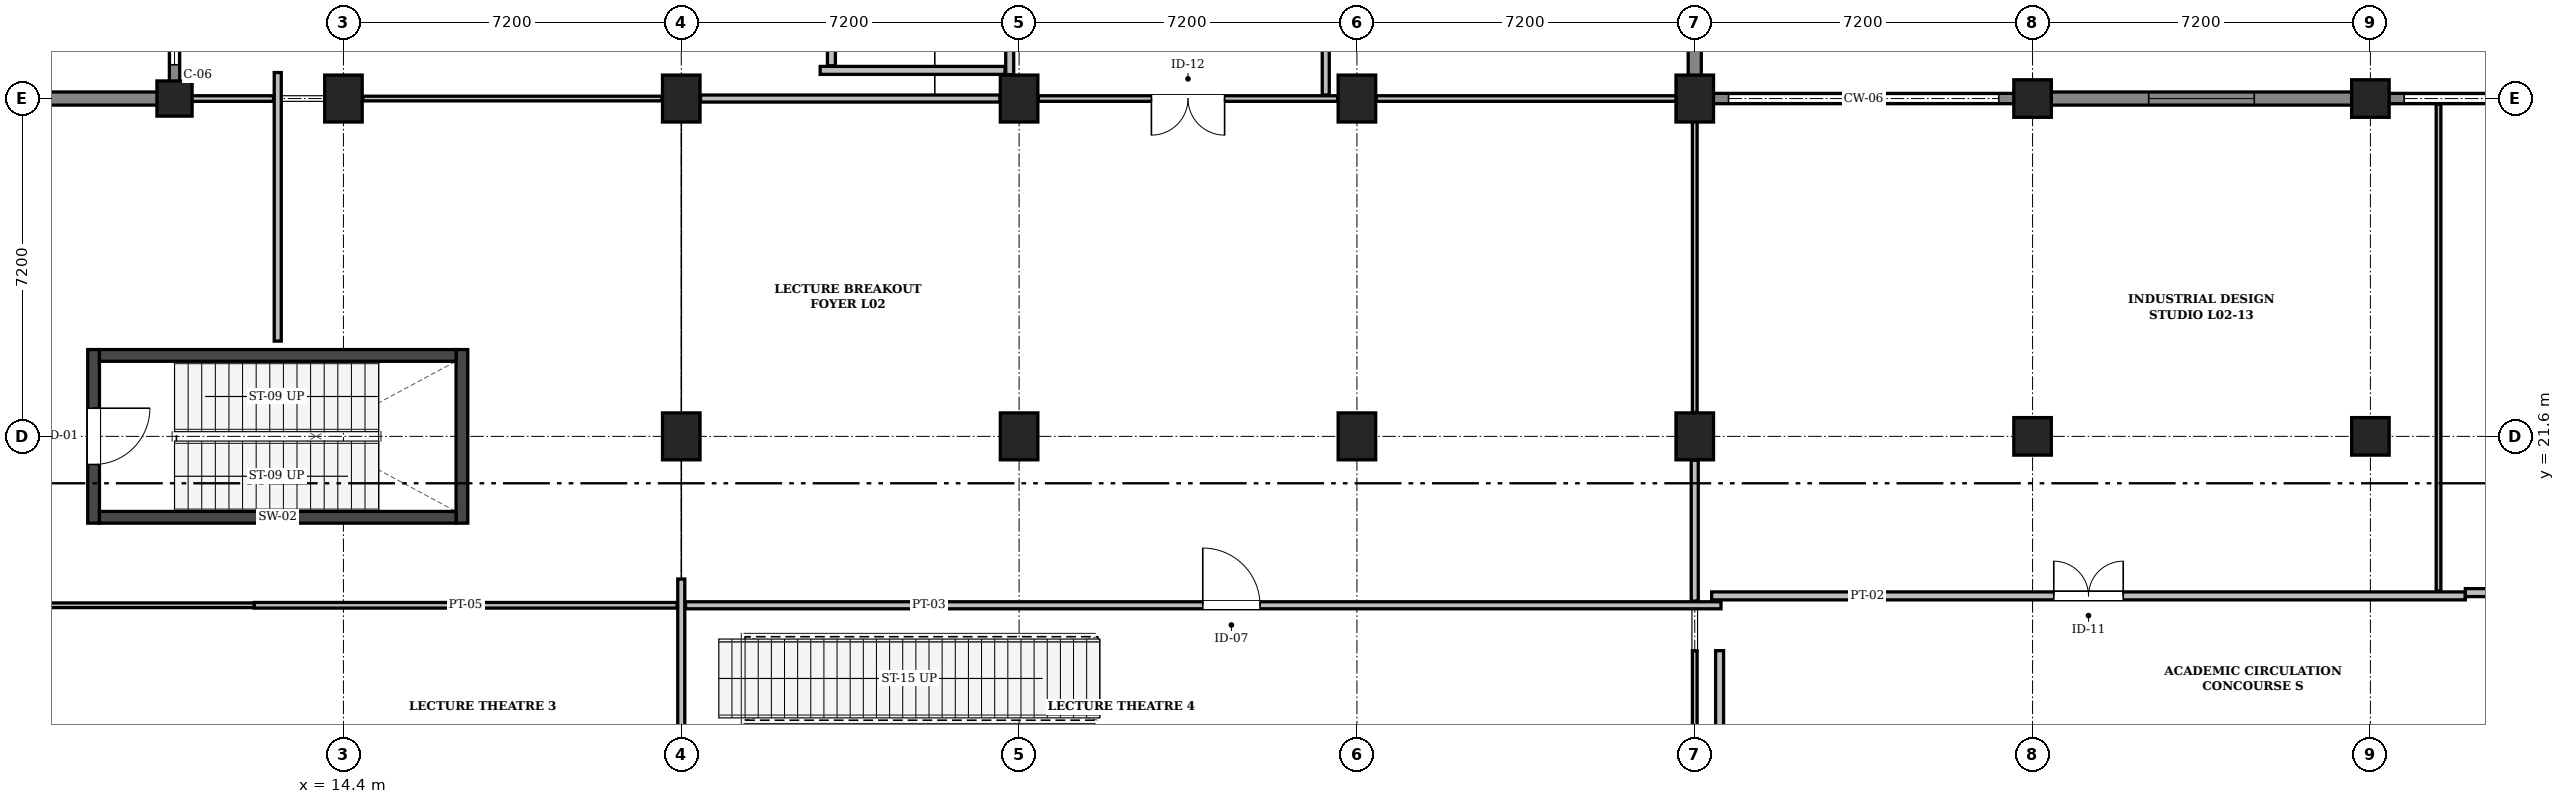
"""IFC4 building model, lengths in metres.
Left out: names, types, materials, properties, quantities, classifications, styles, units other than length and angle.
Written with IfcOpenShell. Run it as: python <this file> out.ifc"""

import sys

from ifc_helpers import new_model, si_unit, direction, frame, frame_2d, origin, origin_2d, place, context, subcontext, project, spatial, rectangle, extrude, element, fill, save


model = new_model("IFC4")
c1 = context("Model", 3, precision=1e-05, world=origin(), true_north=direction((0.0, 1.0)))
c2 = subcontext(c1, "Body", "Model", "MODEL_VIEW")
j1 = project(units=[si_unit("LENGTHUNIT", "METRE"), si_unit("PLANEANGLEUNIT", "RADIAN")], contexts=[c1])
p1 = place(None, origin())
s1 = spatial("IfcSite", under=j1, at=p1, CompositionType="ELEMENT")
p2 = place(p1, origin())
s2 = spatial("IfcBuilding", under=s1, at=p2, CompositionType="ELEMENT")
p3 = place(p2, frame((0.0, 0.0, 9.6)))
s3 = spatial("IfcBuildingStorey", under=s2, at=p3, CompositionType="ELEMENT", Elevation=9.6)
p4 = place(p3, frame((10.8, 28.8, 0.0), z_axis=(0.0, 0.0, 1.0), x_axis=(1.0, 0.0, 0.0)))
e1 = element("IfcColumn", 1, at=p4, inside=s3, PredefinedType="COLUMN", context=c2, shape_type="SweptSolid", body=[
    extrude(rectangle(XDim=0.75, YDim=0.75, at=origin_2d()), origin(), (0.0, 0.0, 1.0), 4.8),
])
for number, where, z_axis, x_axis in (
    (2, (14.4, 28.8, 0.0), (0.0, 0.0, 1.0), (1.0, 0.0, 0.0)),
    (3, (21.6, 21.6, 0.0), (0.0, 0.0, 1.0), (1.0, 0.0, 0.0)),
    (4, (21.6, 28.8, 0.0), (0.0, 0.0, 1.0), (1.0, 0.0, 0.0)),
    (5, (28.8, 21.6, 0.0), (0.0, 0.0, 1.0), (1.0, 0.0, 0.0)),
    (6, (28.8, 28.8, 0.0), (0.0, 0.0, 1.0), (1.0, 0.0, 0.0)),
    (7, (36.0, 21.6, 0.0), (0.0, 0.0, 1.0), (1.0, 0.0, 0.0)),
    (8, (36.0, 28.8, 0.0), (0.0, 0.0, 1.0), (1.0, 0.0, 0.0)),
    (9, (43.2, 21.6, 0.0), (0.0, 0.0, 1.0), (1.0, 0.0, 0.0)),
    (10, (43.2, 28.8, 0.0), (0.0, 0.0, 1.0), (1.0, 0.0, 0.0)),
):
    element("IfcColumn", number, at=place(p3, frame(where, z_axis=z_axis, x_axis=x_axis)), inside=s3, PredefinedType="COLUMN", context=c2, shape_type="SweptSolid", body=[
        extrude(rectangle(XDim=0.8, YDim=1.0, at=origin_2d()), origin(), (0.0, 0.0, 1.0), 4.8),
    ])
for number, where, z_axis, x_axis in (
    (11, (50.4, 21.6, 0.0), (0.0, 0.0, 1.0), (1.0, 0.0, 0.0)),
    (12, (50.4, 28.8, 0.0), (0.0, 0.0, 1.0), (1.0, 0.0, 0.0)),
    (13, (57.6, 21.6, 0.0), (0.0, 0.0, 1.0), (1.0, 0.0, 0.0)),
    (14, (57.6, 28.8, 0.0), (0.0, 0.0, 1.0), (1.0, 0.0, 0.0)),
):
    element("IfcColumn", number, at=place(p3, frame(where, z_axis=z_axis, x_axis=x_axis)), inside=s3, PredefinedType="COLUMN", context=c2, shape_type="SweptSolid", body=[
        extrude(rectangle(XDim=0.8, YDim=0.8, at=origin_2d()), origin(), (0.0, 0.0, 1.0), 4.8),
    ])
p5 = place(p3, frame((10.8, 28.966, 0.0), z_axis=(0.0, 0.0, 1.0), x_axis=(0.0, 1.0, 0.0)))
e15 = element("IfcWall", 15, at=p5, inside=s3, PredefinedType="SOLIDWALL", context=c2, shape_type="SweptSolid", body=[
    extrude(rectangle(XDim=7.034, YDim=0.22, at=frame_2d((3.517, 0.0))), origin(), (0.0, 0.0, 1.0), 1.24),
])
p6 = place(p3, frame((7.2, 28.8, 0.0), z_axis=(0.0, 0.0, 1.0), x_axis=(1.0, 0.0, 0.0)))
e16 = element("IfcWall", 16, at=p6, inside=s3, PredefinedType="SOLIDWALL", context=c2, shape_type="SweptSolid", body=[
    extrude(rectangle(XDim=3.75, YDim=0.28, at=frame_2d((1.875, 0.0))), origin(), (0.0, 0.0, 1.0), 4.52),
])
p7 = place(p3, frame((43.05, 28.8, 0.0), z_axis=(0.0, 0.0, 1.0), x_axis=(1.0, 0.0, 0.0)))
e17 = element("IfcWall", 17, at=p7, inside=s3, PredefinedType="SOLIDWALL", context=c2, shape_type="SweptSolid", body=[
    extrude(rectangle(XDim=7.35, YDim=0.22, at=frame_2d((3.675, 0.0))), origin(), (0.0, 0.0, 1.0), 1.24),
])
p8 = place(p3, frame((50.4, 28.8, 0.0), z_axis=(0.0, 0.0, 1.0), x_axis=(1.0, 0.0, 0.0)))
e18 = element("IfcWall", 18, at=p8, inside=s3, PredefinedType="SOLIDWALL", context=c2, shape_type="SweptSolid", body=[
    extrude(rectangle(XDim=7.2, YDim=0.28, at=frame_2d((3.6, 0.0))), origin(), (0.0, 0.0, 1.0), 4.52),
])
p9 = place(p8, frame((2.475, 0.0, 0.95)))
e19 = element("IfcOpeningElement", 19, at=p9, cuts=e18, PredefinedType="OPENING", context=c2, shape_type="SweptSolid", body=[
    extrude(rectangle(XDim=2.25, YDim=1.55, at=frame_2d((1.125, 0.775))), frame((0.0, 0.152, 0.0), z_axis=(0.0, -1.0, 0.0), x_axis=(1.0, 0.0, 0.0)), (0.0, 0.0, 1.0), 0.304),
])
p10 = place(p3, frame((57.6, 28.8, 0.0), z_axis=(0.0, 0.0, 1.0), x_axis=(1.0, 0.0, 0.0)))
e20 = element("IfcWall", 20, at=p10, inside=s3, PredefinedType="SOLIDWALL", context=c2, shape_type="SweptSolid", body=[
    extrude(rectangle(XDim=7.2, YDim=0.22, at=frame_2d((3.6, 0.0))), origin(), (0.0, 0.0, 1.0), 1.24),
])
p11 = place(p3, frame((43.2, 36.0, 0.0), z_axis=(0.0, 0.0, 1.0), x_axis=(0.0, -1.0, 0.0)))
e21 = element("IfcWall", 21, at=p11, inside=s3, PredefinedType="SOLIDWALL", context=c2, shape_type="SweptSolid", body=[
    extrude(rectangle(XDim=7.034, YDim=0.28, at=frame_2d((3.517, 0.0))), origin(), (0.0, 0.0, 1.0), 4.52),
])
p12 = place(p11, frame((1.048, 0.0, 0.95)))
e22 = element("IfcOpeningElement", 22, at=p12, cuts=e21, PredefinedType="OPENING", context=c2, shape_type="SweptSolid", body=[
    extrude(rectangle(XDim=1.7, YDim=1.8, at=frame_2d((0.85, 0.9))), frame((0.0, 0.152, 0.0), z_axis=(0.0, -1.0, 0.0), x_axis=(1.0, 0.0, 0.0)), (0.0, 0.0, 1.0), 0.304),
])
p13 = place(p3, frame((9.075, 19.75, 0.0), z_axis=(0.0, 0.0, 1.0), x_axis=(0.0, 1.0, 0.0)))
e23 = element("IfcWall", 23, at=p13, inside=s3, PredefinedType="SHEAR", context=c2, shape_type="SweptSolid", body=[
    extrude(rectangle(XDim=3.7, YDim=0.25, at=frame_2d((1.85, 0.0))), origin(), (0.0, 0.0, 1.0), 4.55),
])
p14 = place(p13, frame((1.25, 0.0, 0.0)))
e24 = element("IfcOpeningElement", 24, at=p14, cuts=e23, PredefinedType="OPENING", context=c2, shape_type="SweptSolid", body=[
    extrude(rectangle(XDim=1.2, YDim=2.15, at=frame_2d((0.6, 1.075))), frame((0.0, 0.137, 0.0), z_axis=(0.0, -1.0, 0.0), x_axis=(1.0, 0.0, 0.0)), (0.0, 0.0, 1.0), 0.274),
])
p15 = place(p3, frame((16.925, 19.75, 0.0), z_axis=(0.0, 0.0, 1.0), x_axis=(0.0, 1.0, 0.0)))
e25 = element("IfcWall", 25, at=p15, inside=s3, PredefinedType="SHEAR", context=c2, shape_type="SweptSolid", body=[
    extrude(rectangle(XDim=3.7, YDim=0.25, at=frame_2d((1.85, 0.0))), origin(), (0.0, 0.0, 1.0), 4.55),
])
for number, where, z_axis, x_axis in (
    (26, (9.2, 19.875, 0.0), (0.0, 0.0, 1.0), (1.0, 0.0, 0.0)),
    (27, (9.2, 23.325, 0.0), (0.0, 0.0, 1.0), (1.0, 0.0, 0.0)),
):
    element("IfcWall", number, at=place(p3, frame(where, z_axis=z_axis, x_axis=x_axis)), inside=s3, PredefinedType="SHEAR", context=c2, shape_type="SweptSolid", body=[
        extrude(rectangle(XDim=7.6, YDim=0.25, at=frame_2d((3.8, 0.0))), origin(), (0.0, 0.0, 1.0), 4.55),
    ])
p16 = place(p3, frame((43.73, 14.041, 0.0), z_axis=(0.0, 0.0, 1.0), x_axis=(0.0, 1.0, 0.0)))
e28 = element("IfcWall", 28, at=p16, inside=s3, PredefinedType="PARTITIONING", context=c2, shape_type="SweptSolid", body=[
    extrude(rectangle(XDim=2.991, YDim=0.17, at=frame_2d((1.496, 0.0))), origin(), (0.0, 0.0, 1.0), 4.46),
])
p17 = place(p3, frame((43.56, 18.2, 0.0), z_axis=(0.0, 0.0, 1.0), x_axis=(1.0, 0.0, 0.0)))
e29 = element("IfcWall", 29, at=p17, inside=s3, PredefinedType="PARTITIONING", context=c2, shape_type="SweptSolid", body=[
    extrude(rectangle(XDim=16.063, YDim=0.17, at=frame_2d((8.032, 0.0))), origin(), (0.0, 0.0, 1.0), 4.46),
])
p18 = place(p17, frame((7.292, 0.0, 0.0)))
e30 = element("IfcOpeningElement", 30, at=p18, cuts=e29, PredefinedType="OPENING", context=c2, shape_type="SweptSolid", body=[
    extrude(rectangle(XDim=1.48, YDim=2.26, at=frame_2d((0.74, 1.13))), frame((0.0, 0.097, 0.0), z_axis=(0.0, -1.0, 0.0), x_axis=(1.0, 0.0, 0.0)), (0.0, 0.0, 1.0), 0.194),
])
p19 = place(p3, frame((59.624, 18.27, 0.0), z_axis=(0.0, 0.0, 1.0), x_axis=(1.0, 0.0, 0.0)))
e31 = element("IfcWall", 31, at=p19, inside=s3, PredefinedType="PARTITIONING", context=c2, shape_type="SweptSolid", body=[
    extrude(rectangle(XDim=22.61, YDim=0.17, at=frame_2d((11.305, 0.0))), origin(), (0.0, 0.0, 1.0), 4.46),
])
p20 = place(p19, frame((10.785, 0.0, 0.0)))
e32 = element("IfcOpeningElement", 32, at=p20, cuts=e31, PredefinedType="OPENING", context=c2, shape_type="SweptSolid", body=[
    extrude(rectangle(XDim=1.04, YDim=2.18, at=frame_2d((0.52, 1.09))), frame((0.0, 0.097, 0.0), z_axis=(0.0, -1.0, 0.0), x_axis=(1.0, 0.0, 0.0)), (0.0, 0.0, 1.0), 0.194),
])
p21 = place(p3, frame((28.6, 29.31, 0.0), z_axis=(0.0, 0.0, 1.0), x_axis=(0.0, 1.0, 0.0)))
e33 = element("IfcWall", 33, at=p21, inside=s3, PredefinedType="PARTITIONING", context=c2, shape_type="SweptSolid", body=[
    extrude(rectangle(XDim=3.485, YDim=0.17, at=frame_2d((1.743, 0.0))), origin(), (0.0, 0.0, 1.0), 4.03),
])
p22 = place(p3, frame((24.56, 29.4, 0.0), z_axis=(0.0, 0.0, 1.0), x_axis=(1.0, 0.0, 0.0)))
e34 = element("IfcWall", 34, at=p22, inside=s3, PredefinedType="PARTITIONING", context=c2, shape_type="SweptSolid", body=[
    extrude(rectangle(XDim=3.94, YDim=0.17, at=frame_2d((1.97, 0.0))), origin(), (0.0, 0.0, 1.0), 4.46),
])
p23 = place(p3, frame((24.8, 29.5, 0.0), z_axis=(0.0, 0.0, 1.0), x_axis=(0.0, 1.0, 0.0)))
e35 = element("IfcWall", 35, at=p23, inside=s3, PredefinedType="PARTITIONING", context=c2, shape_type="SweptSolid", body=[
    extrude(rectangle(XDim=3.295, YDim=0.17, at=frame_2d((1.648, 0.0))), origin(), (0.0, 0.0, 1.0), 4.46),
])
p24 = place(p3, frame((21.6, 14.91, 0.0), z_axis=(0.0, 0.0, 1.0), x_axis=(0.0, 1.0, 0.0)))
e36 = element("IfcWall", 36, at=p24, inside=s3, PredefinedType="PARTITIONING", context=c2, shape_type="SweptSolid", body=[
    extrude(rectangle(XDim=3.65, YDim=0.15, at=frame_2d((1.825, 0.0))), origin(), (0.0, 0.0, 1.0), 4.03),
])
p25 = place(p3, frame((12.5, 18.0, 0.0), z_axis=(0.0, 0.0, 1.0), x_axis=(1.0, 0.0, 0.0)))
e37 = element("IfcWall", 37, at=p25, inside=s3, PredefinedType="PARTITIONING", context=c2, shape_type="SweptSolid", body=[
    extrude(rectangle(XDim=9.01, YDim=0.12, at=frame_2d((4.505, 0.0))), origin(), (0.0, 0.0, 1.0), 4.46),
])
p26 = place(p3, frame((0.122, 18.0, 0.0), z_axis=(0.0, 0.0, 1.0), x_axis=(1.0, 0.0, 0.0)))
e38 = element("IfcWall", 38, at=p26, inside=s3, PredefinedType="PARTITIONING", context=c2, shape_type="SweptSolid", body=[
    extrude(rectangle(XDim=12.378, YDim=0.1, at=frame_2d((6.189, 0.0))), origin(), (0.0, 0.0, 1.0), 4.46),
])
p27 = place(p26, frame((5.185, 0.0, 0.0)))
e39 = element("IfcOpeningElement", 39, at=p27, cuts=e38, PredefinedType="OPENING", context=c2, shape_type="SweptSolid", body=[
    extrude(rectangle(XDim=1.84, YDim=2.3, at=frame_2d((0.92, 1.15))), frame((0.0, 0.062, 0.0), z_axis=(0.0, -1.0, 0.0), x_axis=(1.0, 0.0, 0.0)), (0.0, 0.0, 1.0), 0.124),
])
p28 = place(p3, frame((21.69, 18.0, 0.0), z_axis=(0.0, 0.0, 1.0), x_axis=(1.0, 0.0, 0.0)))
e40 = element("IfcWall", 40, at=p28, inside=s3, PredefinedType="PARTITIONING", context=c2, shape_type="SweptSolid", body=[
    extrude(rectangle(XDim=22.07, YDim=0.15, at=frame_2d((11.035, 0.0))), origin(), (0.0, 0.0, 1.0), 4.46),
])
p29 = place(p28, frame((11.025, 0.0, 0.0)))
e41 = element("IfcOpeningElement", 41, at=p29, cuts=e40, PredefinedType="OPENING", context=c2, shape_type="SweptSolid", body=[
    extrude(rectangle(XDim=1.22, YDim=2.22, at=frame_2d((0.61, 1.11))), frame((0.0, 0.087, 0.0), z_axis=(0.0, -1.0, 0.0), x_axis=(1.0, 0.0, 0.0)), (0.0, 0.0, 1.0), 0.174),
])
p30 = place(p3, frame((43.2, 14.91, 0.0), z_axis=(0.0, 0.0, 1.0), x_axis=(0.0, 1.0, 0.0)))
e42 = element("IfcWall", 42, at=p30, inside=s3, PredefinedType="PARTITIONING", context=c2, shape_type="SweptSolid", body=[
    extrude(rectangle(XDim=2.122, YDim=0.1, at=frame_2d((1.061, 0.0))), origin(), (0.0, 0.0, 1.0), 4.03),
])
p31 = place(p3, frame((13.0, 23.63, 0.0), z_axis=(0.0, 0.0, 1.0), x_axis=(0.0, 1.0, 0.0)))
e43 = element("IfcWall", 43, at=p31, inside=s3, PredefinedType="PARTITIONING", context=c2, shape_type="SweptSolid", body=[
    extrude(rectangle(XDim=5.724, YDim=0.15, at=frame_2d((2.862, 0.0))), origin(), (0.0, 0.0, 1.0), 4.46),
])
p32 = place(p3, frame((29.21, 28.8, 0.0), z_axis=(0.0, 0.0, 1.0), x_axis=(1.0, 0.0, 0.0)))
e44 = element("IfcWall", 44, at=p32, inside=s3, PredefinedType="PARTITIONING", context=c2, shape_type="SweptSolid", body=[
    extrude(rectangle(XDim=6.38, YDim=0.12, at=frame_2d((3.19, 0.0))), origin(), (0.0, 0.0, 1.0), 3.93),
])
p33 = place(p32, frame((2.41, 0.0, 0.0)))
e45 = element("IfcOpeningElement", 45, at=p33, cuts=e44, PredefinedType="OPENING", context=c2, shape_type="SweptSolid", body=[
    extrude(rectangle(XDim=1.56, YDim=2.26, at=frame_2d((0.78, 1.13))), frame((0.0, 0.072, 0.0), z_axis=(0.0, -1.0, 0.0), x_axis=(1.0, 0.0, 0.0)), (0.0, 0.0, 1.0), 0.144),
])
p34 = place(p3, frame((14.81, 28.8, 0.0), z_axis=(0.0, 0.0, 1.0), x_axis=(1.0, 0.0, 0.0)))
e46 = element("IfcWall", 46, at=p34, inside=s3, PredefinedType="PARTITIONING", context=c2, shape_type="SweptSolid", body=[
    extrude(rectangle(XDim=6.38, YDim=0.1, at=frame_2d((3.19, 0.0))), origin(), (0.0, 0.0, 1.0), 3.93),
])
p35 = place(p3, frame((22.01, 28.8, 0.0), z_axis=(0.0, 0.0, 1.0), x_axis=(1.0, 0.0, 0.0)))
e47 = element("IfcWall", 47, at=p35, inside=s3, PredefinedType="PARTITIONING", context=c2, shape_type="SweptSolid", body=[
    extrude(rectangle(XDim=6.38, YDim=0.15, at=frame_2d((3.19, 0.0))), origin(), (0.0, 0.0, 1.0), 3.93),
])
p36 = place(p3, frame((36.41, 28.8, 0.0), z_axis=(0.0, 0.0, 1.0), x_axis=(1.0, 0.0, 0.0)))
e48 = element("IfcWall", 48, at=p36, inside=s3, PredefinedType="PARTITIONING", context=c2, shape_type="SweptSolid", body=[
    extrude(rectangle(XDim=6.628, YDim=0.12, at=frame_2d((3.314, 0.0))), origin(), (0.0, 0.0, 1.0), 3.93),
])
p37 = place(p3, frame((43.2, 22.11, 0.0), z_axis=(0.0, 0.0, 1.0), x_axis=(0.0, 1.0, 0.0)))
e49 = element("IfcWall", 49, at=p37, inside=s3, PredefinedType="PARTITIONING", context=c2, shape_type="SweptSolid", body=[
    extrude(rectangle(XDim=6.568, YDim=0.1, at=frame_2d((3.284, 0.0))), origin(), (0.0, 0.0, 1.0), 4.03),
])
p38 = place(p3, frame((43.2, 18.09, 0.0), z_axis=(0.0, 0.0, 1.0), x_axis=(0.0, 1.0, 0.0)))
e50 = element("IfcWall", 50, at=p38, inside=s3, PredefinedType="PARTITIONING", context=c2, shape_type="SweptSolid", body=[
    extrude(rectangle(XDim=3.0, YDim=0.15, at=frame_2d((1.5, 0.0))), origin(), (0.0, 0.0, 1.0), 4.03),
])
p39 = place(p3, frame((10.962, 28.8, 0.0), z_axis=(0.0, 0.0, 1.0), x_axis=(1.0, 0.0, 0.0)))
e51 = element("IfcWall", 51, at=p39, inside=s3, PredefinedType="PARTITIONING", context=c2, shape_type="SweptSolid", body=[
    extrude(rectangle(XDim=1.948, YDim=0.12, at=frame_2d((0.974, 0.0))), origin(), (0.0, 0.0, 1.0), 3.93),
])
p40 = place(p3, frame((35.336, 28.875, 0.0), z_axis=(0.0, 0.0, 1.0), x_axis=(0.0, 1.0, 0.0)))
e52 = element("IfcWall", 52, at=p40, inside=s3, PredefinedType="PARTITIONING", context=c2, shape_type="SweptSolid", body=[
    extrude(rectangle(XDim=3.437, YDim=0.15, at=frame_2d((1.719, 0.0))), origin(), (0.0, 0.0, 1.0), 4.46),
])
p41 = place(p3, frame((59.052, 18.3, 0.0), z_axis=(0.0, 0.0, 1.0), x_axis=(0.0, 1.0, 0.0)))
e53 = element("IfcWall", 53, at=p41, inside=s3, PredefinedType="PARTITIONING", context=c2, shape_type="SweptSolid", body=[
    extrude(rectangle(XDim=10.378, YDim=0.1, at=frame_2d((5.189, 0.0))), origin(), (0.0, 0.0, 1.0), 4.46),
])
p42 = place(p9, origin())
e54 = element("IfcWindow", 54, at=p42, inside=s3, PartitioningType="SINGLE_PANEL", PredefinedType="WINDOW", context=c2, shape_type="SweptSolid", body=[
    extrude(rectangle(XDim=2.25, YDim=1.55, at=frame_2d((1.125, 0.775))), frame((0.0, 0.03, 0.0), z_axis=(0.0, -1.0, 0.0), x_axis=(1.0, 0.0, 0.0)), (0.0, 0.0, 1.0), 0.06),
])
fill(e19, e54)
p43 = place(p14, frame((1.2, 0.0, 0.0), z_axis=(0.0, 0.0, 1.0), x_axis=(-1.0, 0.0, 0.0)))
e55 = element("IfcDoor", 55, at=p43, inside=s3, OperationType="SINGLE_SWING_LEFT", PredefinedType="DOOR", context=c2, shape_type="SweptSolid", body=[
    extrude(rectangle(XDim=1.2, YDim=2.15, at=frame_2d((0.6, 1.075))), frame((0.0, 0.025, 0.0), z_axis=(0.0, -1.0, 0.0), x_axis=(1.0, 0.0, 0.0)), (0.0, 0.0, 1.0), 0.05),
])
fill(e24, e55)
p44 = place(p29, origin())
e56 = element("IfcDoor", 56, at=p44, inside=s3, OperationType="SINGLE_SWING_LEFT", PredefinedType="DOOR", context=c2, shape_type="SweptSolid", body=[
    extrude(rectangle(XDim=1.22, YDim=2.22, at=frame_2d((0.61, 1.11))), frame((0.0, 0.025, 0.0), z_axis=(0.0, -1.0, 0.0), x_axis=(1.0, 0.0, 0.0)), (0.0, 0.0, 1.0), 0.05),
])
fill(e41, e56)
p45 = place(p18, origin())
e57 = element("IfcDoor", 57, at=p45, inside=s3, OperationType="DOUBLE_DOOR_SINGLE_SWING", PredefinedType="DOOR", context=c2, shape_type="SweptSolid", body=[
    extrude(rectangle(XDim=1.48, YDim=2.26, at=frame_2d((0.74, 1.13))), frame((0.0, 0.025, 0.0), z_axis=(0.0, -1.0, 0.0), x_axis=(1.0, 0.0, 0.0)), (0.0, 0.0, 1.0), 0.05),
])
fill(e30, e57)
p46 = place(p33, frame((1.56, 0.0, 0.0), z_axis=(0.0, 0.0, 1.0), x_axis=(-1.0, 0.0, 0.0)))
e58 = element("IfcDoor", 58, at=p46, inside=s3, OperationType="DOUBLE_DOOR_SINGLE_SWING", PredefinedType="DOOR", context=c2, shape_type="SweptSolid", body=[
    extrude(rectangle(XDim=1.56, YDim=2.26, at=frame_2d((0.78, 1.13))), frame((0.0, 0.025, 0.0), z_axis=(0.0, -1.0, 0.0), x_axis=(1.0, 0.0, 0.0)), (0.0, 0.0, 1.0), 0.05),
])
fill(e45, e58)
save(model, sys.argv[1])
